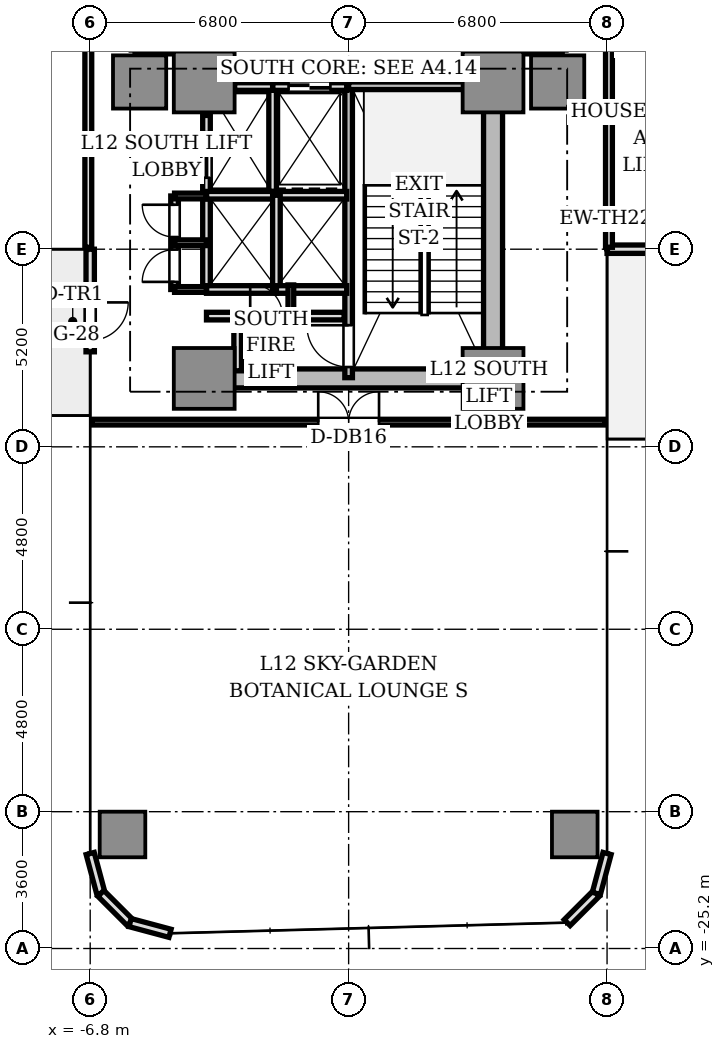
"""IFC4 building model, lengths in metres.
Left out: names, types, materials, properties, quantities, classifications, styles, units other than length and angle.
Written with IfcOpenShell. Run it as: python <this file> out.ifc"""

import sys

from ifc_helpers import new_model, si_unit, direction, frame, frame_2d, origin, origin_2d, place, context, subcontext, project, spatial, rectangle, extrude, source, transform, mapped, element, fill, save


model = new_model("IFC4")
c1 = context("Model", 3, precision=1e-05, world=origin(), true_north=direction((0.0, 1.0)))
c2 = subcontext(c1, "Body", "Model", "MODEL_VIEW")
j1 = project(units=[si_unit("LENGTHUNIT", "METRE"), si_unit("PLANEANGLEUNIT", "RADIAN")], contexts=[c1])
p1 = place(None, origin())
s1 = spatial("IfcSite", under=j1, at=p1, CompositionType="ELEMENT")
p2 = place(p1, origin())
s2 = spatial("IfcBuilding", under=s1, at=p2, CompositionType="ELEMENT")
p3 = place(p2, frame((0.0, 0.0, 46.55)))
s3 = spatial("IfcBuildingStorey", under=s2, at=p3, CompositionType="ELEMENT", Elevation=46.55)
p4 = place(p3, frame((-3.55, -10.2, 0.0), z_axis=(0.0, 0.0, 1.0), x_axis=(1.0, 0.0, 0.0)))
e1 = element("IfcWall", 1, at=p4, inside=s3, PredefinedType="SHEAR", context=c2, shape_type="SweptSolid", body=[
    extrude(rectangle(XDim=7.1, YDim=0.5, at=frame_2d((3.55, 0.0))), origin(), (0.0, 0.0, 1.0), 4.26),
])
p5 = place(p3, frame((3.8, -9.75, 0.0), z_axis=(0.0, 0.0, 1.0), x_axis=(0.0, 1.0, 0.0)))
e2 = element("IfcWall", 2, at=p5, inside=s3, PredefinedType="SHEAR", context=c2, shape_type="SweptSolid", body=[
    extrude(rectangle(XDim=6.9, YDim=0.5, at=frame_2d((3.45, 0.0))), origin(), (0.0, 0.0, 1.0), 4.26),
])
m1 = source(origin(), c2, "Body", "SweptSolid", [
    extrude(rectangle(XDim=1.6, YDim=1.6, at=origin_2d()), origin(), (0.0, 0.0, 1.0), 4.26),
])
for number, where, z_axis, x_axis in (
    (3, (-3.8, -2.4, 0.0), (0.0, 0.0, 1.0), (1.0, 0.0, 0.0)),
    (4, (3.8, -2.4, 0.0), (0.0, 0.0, 1.0), (1.0, 0.0, 0.0)),
    (5, (-3.8, -10.2, 0.0), (0.0, 0.0, 1.0), (1.0, 0.0, 0.0)),
    (6, (3.8, -10.2, 0.0), (0.0, 0.0, 1.0), (1.0, 0.0, 0.0)),
):
    element("IfcColumn", number, at=place(p3, frame(where, z_axis=z_axis, x_axis=x_axis)), inside=s3, PredefinedType="COLUMN", context=c2, shape_type="MappedRepresentation", body=[
        mapped(m1, transform((0.0, 0.0, 0.0), scale=1.0)),
    ])
m2 = source(origin(), c2, "Body", "SweptSolid", [
    extrude(rectangle(XDim=1.4, YDim=1.4, at=origin_2d()), origin(), (0.0, 0.0, 1.0), 4.26),
])
for number, where, z_axis, x_axis in (
    (7, (5.5, -2.4, 0.0), (0.0, 0.0, 1.0), (1.0, 0.0, 0.0)),
    (8, (-5.5, -2.4, 0.0), (0.0, 0.0, 1.0), (1.0, 0.0, 0.0)),
):
    element("IfcColumn", number, at=place(p3, frame(where, z_axis=z_axis, x_axis=x_axis)), inside=s3, PredefinedType="COLUMN", context=c2, shape_type="MappedRepresentation", body=[
        mapped(m2, transform((0.0, 0.0, 0.0), scale=1.0)),
    ])
m3 = source(origin(), c2, "Body", "SweptSolid", [
    extrude(rectangle(XDim=1.2, YDim=1.2, at=origin_2d()), origin(), (0.0, 0.0, 1.0), 4.26),
])
for number, where, z_axis, x_axis in (
    (9, (-5.95, -22.2, 0.0), (0.0, 0.0, 1.0), (1.0, 0.0, 0.0)),
    (10, (5.95, -22.2, 0.0), (0.0, 0.0, 1.0), (1.0, 0.0, 0.0)),
):
    element("IfcColumn", number, at=place(p3, frame(where, z_axis=z_axis, x_axis=x_axis)), inside=s3, PredefinedType="COLUMN", context=c2, shape_type="MappedRepresentation", body=[
        mapped(m3, transform((0.0, 0.0, 0.0), scale=1.0)),
    ])
p6 = place(p3, frame((6.8, -6.8, 0.0), z_axis=(0.0, 0.0, 1.0), x_axis=(1.0, 0.0, 0.0)))
e11 = element("IfcWall", 11, at=p6, inside=s3, PredefinedType="STANDARD", context=c2, shape_type="SweptSolid", body=[
    extrude(rectangle(XDim=2.7, YDim=0.22, at=frame_2d((1.35, 0.0))), origin(), (0.0, 0.0, 1.0), 4.26),
])
p7 = place(p6, frame((1.4, 0.0, 0.0)))
e12 = element("IfcOpeningElement", 12, at=p7, cuts=e11, PredefinedType="OPENING", context=c2, shape_type="SweptSolid", body=[
    extrude(rectangle(XDim=1.0, YDim=2.2, at=frame_2d((0.5, 1.1))), frame((0.0, 0.12, 0.0), z_axis=(0.0, -1.0, 0.0), x_axis=(1.0, 0.0, 0.0)), (0.0, 0.0, 1.0), 0.24),
])
p8 = place(p3, frame((-6.8, -6.8, 0.0), z_axis=(0.0, 0.0, 1.0), x_axis=(0.0, -1.0, 0.0)))
e13 = element("IfcWall", 13, at=p8, inside=s3, PredefinedType="STANDARD", context=c2, shape_type="SweptSolid", body=[
    extrude(rectangle(XDim=2.7, YDim=0.22, at=frame_2d((1.35, 0.0))), origin(), (0.0, 0.0, 1.0), 4.26),
])
p9 = place(p8, frame((1.4, 0.0, 0.0)))
e14 = element("IfcOpeningElement", 14, at=p9, cuts=e13, PredefinedType="OPENING", context=c2, shape_type="SweptSolid", body=[
    extrude(rectangle(XDim=1.0, YDim=2.2, at=frame_2d((0.5, 1.1))), frame((0.0, 0.12, 0.0), z_axis=(0.0, -1.0, 0.0), x_axis=(1.0, 0.0, 0.0)), (0.0, 0.0, 1.0), 0.24),
])
for number, where, z_axis, x_axis in (
    (15, (-6.8, -22.7, 0.0), (0.0, 0.0, 1.0), (0.259, -0.966, 0.0)),
    (16, (-6.519, -23.75, 0.0), (0.0, 0.0, 1.0), (0.707, -0.707, 0.0)),
    (17, (-5.75, -24.519, 0.0), (0.0, 0.0, 1.0), (0.966, -0.259, 0.0)),
    (18, (5.75, -24.519, 0.0), (0.0, 0.0, 1.0), (0.707, 0.707, 0.0)),
    (19, (6.519, -23.75, 0.0), (0.0, 0.0, 1.0), (0.259, 0.966, 0.0)),
):
    element("IfcWall", number, at=place(p3, frame(where, z_axis=z_axis, x_axis=x_axis)), inside=s3, PredefinedType="STANDARD", context=c2, shape_type="SweptSolid", body=[
        extrude(rectangle(XDim=1.087, YDim=0.22, at=frame_2d((0.543, 0.0))), origin(), (0.0, 0.0, 1.0), 4.26),
    ])
p10 = place(p3, frame((0.0, -10.18, 0.0), z_axis=(0.0, 0.0, 1.0), x_axis=(0.0, 1.0, 0.0)))
e20 = element("IfcWall", 20, at=p10, inside=s3, PredefinedType="SOLIDWALL", context=c2, shape_type="SweptSolid", body=[
    extrude(rectangle(XDim=7.68, YDim=0.2, at=frame_2d((3.84, 0.0))), origin(), (0.0, 0.0, 1.0), 4.26),
])
p11 = place(p10, frame((0.28, 0.0, 0.0)))
e21 = element("IfcOpeningElement", 21, at=p11, cuts=e20, PredefinedType="OPENING", context=c2, shape_type="SweptSolid", body=[
    extrude(rectangle(XDim=1.1, YDim=2.15, at=frame_2d((0.55, 1.075))), frame((0.0, 0.11, 0.0), z_axis=(0.0, -1.0, 0.0), x_axis=(1.0, 0.0, 0.0)), (0.0, 0.0, 1.0), 0.22),
])
p12 = place(p3, frame((0.0, -2.5, 0.0), z_axis=(0.0, 0.0, 1.0), x_axis=(1.0, 0.0, 0.0)))
e22 = element("IfcWall", 22, at=p12, inside=s3, PredefinedType="SOLIDWALL", context=c2, shape_type="SweptSolid", body=[
    extrude(rectangle(XDim=3.72, YDim=0.2, at=frame_2d((1.86, 0.0))), origin(), (0.0, 0.0, 1.0), 4.26),
])
p13 = place(p3, frame((-2.0, -5.28, 0.0), z_axis=(0.0, 0.0, 1.0), x_axis=(0.0, 1.0, 0.0)))
e23 = element("IfcWall", 23, at=p13, inside=s3, PredefinedType="SOLIDWALL", context=c2, shape_type="SweptSolid", body=[
    extrude(rectangle(XDim=2.78, YDim=0.2, at=frame_2d((1.39, 0.0))), origin(), (0.0, 0.0, 1.0), 3.81),
])
p14 = place(p3, frame((-2.0, -2.52, 0.0), z_axis=(0.0, 0.0, 1.0), x_axis=(1.0, 0.0, 0.0)))
e24 = element("IfcWall", 24, at=p14, inside=s3, PredefinedType="SOLIDWALL", context=c2, shape_type="SweptSolid", body=[
    extrude(rectangle(XDim=1.95, YDim=0.2, at=frame_2d((0.975, 0.0))), origin(), (0.0, 0.0, 1.0), 3.81),
])
p15 = place(p14, frame((0.42, 0.0, 0.0)))
e25 = element("IfcOpeningElement", 25, at=p15, cuts=e24, PredefinedType="OPENING", context=c2, shape_type="SweptSolid", body=[
    extrude(rectangle(XDim=1.1, YDim=2.2, at=frame_2d((0.55, 1.1))), frame((0.0, 0.11, 0.0), z_axis=(0.0, -1.0, 0.0), x_axis=(1.0, 0.0, 0.0)), (0.0, 0.0, 1.0), 0.22),
])
p16 = place(p3, frame((-3.0, -2.52, 0.0), z_axis=(0.0, 0.0, 1.0), x_axis=(1.0, 0.0, 0.0)))
e26 = element("IfcWall", 26, at=p16, inside=s3, PredefinedType="SOLIDWALL", context=c2, shape_type="SweptSolid", body=[
    extrude(rectangle(XDim=1.0, YDim=0.2, at=frame_2d((0.5, 0.0))), origin(), (0.0, 0.0, 1.0), 3.81),
])
p17 = place(p3, frame((-3.74, -5.36, 0.0), z_axis=(0.0, 0.0, 1.0), x_axis=(0.0, 1.0, 0.0)))
e27 = element("IfcWall", 27, at=p17, inside=s3, PredefinedType="SOLIDWALL", context=c2, shape_type="SweptSolid", body=[
    extrude(rectangle(XDim=2.08, YDim=0.2, at=frame_2d((1.04, 0.0))), origin(), (0.0, 0.0, 1.0), 3.81),
])
p18 = place(p17, frame((0.44, 0.0, 0.0)))
e28 = element("IfcOpeningElement", 28, at=p18, cuts=e27, PredefinedType="OPENING", context=c2, shape_type="SweptSolid", body=[
    extrude(rectangle(XDim=1.2, YDim=2.2, at=frame_2d((0.6, 1.1))), frame((0.0, 0.11, 0.0), z_axis=(0.0, -1.0, 0.0), x_axis=(1.0, 0.0, 0.0)), (0.0, 0.0, 1.0), 0.22),
])
p19 = place(p3, frame((-3.74, -7.86, 0.0), z_axis=(0.0, 0.0, 1.0), x_axis=(0.0, 1.0, 0.0)))
e29 = element("IfcWall", 29, at=p19, inside=s3, PredefinedType="SOLIDWALL", context=c2, shape_type="SweptSolid", body=[
    extrude(rectangle(XDim=2.48, YDim=0.2, at=frame_2d((1.24, 0.0))), origin(), (0.0, 0.0, 1.0), 3.81),
])
p20 = place(p3, frame((-3.74, -7.86, 0.0), z_axis=(0.0, 0.0, 1.0), x_axis=(1.0, 0.0, 0.0)))
e30 = element("IfcWall", 30, at=p20, inside=s3, PredefinedType="SOLIDWALL", context=c2, shape_type="SweptSolid", body=[
    extrude(rectangle(XDim=1.84, YDim=0.2, at=frame_2d((0.92, 0.0))), origin(), (0.0, 0.0, 1.0), 3.81),
])
p21 = place(p3, frame((-3.74, -5.38, 0.0), z_axis=(0.0, 0.0, 1.0), x_axis=(1.0, 0.0, 0.0)))
e31 = element("IfcWall", 31, at=p21, inside=s3, PredefinedType="SOLIDWALL", context=c2, shape_type="SweptSolid", body=[
    extrude(rectangle(XDim=3.69, YDim=0.2, at=frame_2d((1.845, 0.0))), origin(), (0.0, 0.0, 1.0), 3.81),
])
p22 = place(p3, frame((-1.9, -7.86, 0.0), z_axis=(0.0, 0.0, 1.0), x_axis=(0.0, 1.0, 0.0)))
e32 = element("IfcWall", 32, at=p22, inside=s3, PredefinedType="SOLIDWALL", context=c2, shape_type="SweptSolid", body=[
    extrude(rectangle(XDim=2.48, YDim=0.2, at=frame_2d((1.24, 0.0))), origin(), (0.0, 0.0, 1.0), 3.81),
])
p23 = place(p3, frame((-1.9, -7.86, 0.0), z_axis=(0.0, 0.0, 1.0), x_axis=(1.0, 0.0, 0.0)))
e33 = element("IfcWall", 33, at=p23, inside=s3, PredefinedType="SOLIDWALL", context=c2, shape_type="SweptSolid", body=[
    extrude(rectangle(XDim=1.85, YDim=0.2, at=frame_2d((0.925, 0.0))), origin(), (0.0, 0.0, 1.0), 3.81),
])
for number, where, z_axis, x_axis in (
    (34, (3.98, -1.56, 0.0), (0.0, 0.0, 1.0), (1.0, 0.0, 0.0)),
    (35, (-5.62, -1.56, 0.0), (0.0, 0.0, 1.0), (1.0, 0.0, 0.0)),
):
    element("IfcWall", number, at=place(p3, frame(where, z_axis=z_axis, x_axis=x_axis)), inside=s3, PredefinedType="SOLIDWALL", context=c2, shape_type="SweptSolid", body=[
        extrude(rectangle(XDim=1.64, YDim=0.2, at=frame_2d((0.82, 0.0))), origin(), (0.0, 0.0, 1.0), 3.81),
    ])
p24 = place(p3, frame((-3.74, -8.56, 0.0), z_axis=(0.0, 0.0, 1.0), x_axis=(1.0, 0.0, 0.0)))
e36 = element("IfcWall", 36, at=p24, inside=s3, PredefinedType="SOLIDWALL", context=c2, shape_type="SweptSolid", body=[
    extrude(rectangle(XDim=3.62, YDim=0.2, at=frame_2d((1.81, 0.0))), origin(), (0.0, 0.0, 1.0), 3.81),
])
p25 = place(p24, frame((1.15, 0.0, 0.0)))
e37 = element("IfcOpeningElement", 37, at=p25, cuts=e36, PredefinedType="OPENING", context=c2, shape_type="SweptSolid", body=[
    extrude(rectangle(XDim=0.85, YDim=2.1, at=frame_2d((0.425, 1.05))), frame((0.0, 0.11, 0.0), z_axis=(0.0, -1.0, 0.0), x_axis=(1.0, 0.0, 0.0)), (0.0, 0.0, 1.0), 0.22),
])
p26 = place(p3, frame((-2.92, -10.0, 0.0), z_axis=(0.0, 0.0, 1.0), x_axis=(0.0, 1.0, 0.0)))
e38 = element("IfcWall", 38, at=p26, inside=s3, PredefinedType="SOLIDWALL", context=c2, shape_type="SweptSolid", body=[
    extrude(rectangle(XDim=1.44, YDim=0.2, at=frame_2d((0.72, 0.0))), origin(), (0.0, 0.0, 1.0), 3.81),
])
p27 = place(p3, frame((-1.52, -8.56, 0.0), z_axis=(0.0, 0.0, 1.0), x_axis=(0.0, 1.0, 0.0)))
e39 = element("IfcWall", 39, at=p27, inside=s3, PredefinedType="PARTITIONING", context=c2, shape_type="SweptSolid", body=[
    extrude(rectangle(XDim=0.82, YDim=0.15, at=frame_2d((0.41, 0.0))), origin(), (0.0, 0.0, 1.0), 3.81),
])
p28 = place(p3, frame((-4.58, -7.86, 0.0), z_axis=(0.0, 0.0, 1.0), x_axis=(0.0, 1.0, 0.0)))
e40 = element("IfcWall", 40, at=p28, inside=s3, PredefinedType="SOLIDWALL", context=c2, shape_type="SweptSolid", body=[
    extrude(rectangle(XDim=2.46, YDim=0.2, at=frame_2d((1.23, 0.0))), origin(), (0.0, 0.0, 1.0), 3.81),
])
p29 = place(p28, frame((0.2, 0.0, 0.0)))
e41 = element("IfcOpeningElement", 41, at=p29, cuts=e40, PredefinedType="OPENING", context=c2, shape_type="SweptSolid", body=[
    extrude(rectangle(XDim=0.85, YDim=2.1, at=frame_2d((0.425, 1.05))), frame((0.0, 0.11, 0.0), z_axis=(0.0, -1.0, 0.0), x_axis=(1.0, 0.0, 0.0)), (0.0, 0.0, 1.0), 0.22),
])
p30 = place(p28, frame((1.38, 0.0, 0.0)))
e42 = element("IfcOpeningElement", 42, at=p30, cuts=e40, PredefinedType="OPENING", context=c2, shape_type="SweptSolid", body=[
    extrude(rectangle(XDim=0.85, YDim=2.1, at=frame_2d((0.425, 1.05))), frame((0.0, 0.11, 0.0), z_axis=(0.0, -1.0, 0.0), x_axis=(1.0, 0.0, 0.0)), (0.0, 0.0, 1.0), 0.22),
])
for number, where, z_axis, x_axis in (
    (43, (-4.58, -5.4, 0.0), (0.0, 0.0, 1.0), (1.0, 0.0, 0.0)),
    (44, (-4.58, -7.86, 0.0), (0.0, 0.0, 1.0), (1.0, 0.0, 0.0)),
    (45, (-4.58, -6.63, 0.0), (0.0, 0.0, 1.0), (1.0, 0.0, 0.0)),
):
    element("IfcWall", number, at=place(p3, frame(where, z_axis=z_axis, x_axis=x_axis)), inside=s3, PredefinedType="PARTITIONING", context=c2, shape_type="SweptSolid", body=[
        extrude(rectangle(XDim=0.84, YDim=0.15, at=frame_2d((0.42, 0.0))), origin(), (0.0, 0.0, 1.0), 3.81),
    ])
p31 = place(p3, frame((6.85, -6.75, 0.0), z_axis=(0.0, 0.0, 1.0), x_axis=(0.0, 1.0, 0.0)))
e46 = element("IfcWall", 46, at=p31, inside=s3, PredefinedType="PARTITIONING", context=c2, shape_type="SweptSolid", body=[
    extrude(rectangle(XDim=5.75, YDim=0.18, at=frame_2d((2.875, 0.0))), origin(), (0.0, 0.0, 1.0), 3.81),
])
p32 = place(p3, frame((-6.85, -0.95, 0.0), z_axis=(0.0, 0.0, 1.0), x_axis=(0.0, -1.0, 0.0)))
e47 = element("IfcWall", 47, at=p32, inside=s3, PredefinedType="PARTITIONING", context=c2, shape_type="SweptSolid", body=[
    extrude(rectangle(XDim=5.8, YDim=0.18, at=frame_2d((2.9, 0.0))), origin(), (0.0, 0.0, 1.0), 3.81),
])
p33 = place(p3, frame((-6.75, -11.35, 0.0), z_axis=(0.0, 0.0, 1.0), x_axis=(1.0, 0.0, 0.0)))
e48 = element("IfcWall", 48, at=p33, inside=s3, PredefinedType="PARTITIONING", context=c2, shape_type="SweptSolid", body=[
    extrude(rectangle(XDim=13.5, YDim=0.15, at=frame_2d((6.75, 0.0))), origin(), (0.0, 0.0, 1.0), 3.81),
])
p34 = place(p33, frame((5.95, 0.0, 0.0)))
e49 = element("IfcOpeningElement", 49, at=p34, cuts=e48, PredefinedType="OPENING", context=c2, shape_type="SweptSolid", body=[
    extrude(rectangle(XDim=1.6, YDim=2.25, at=frame_2d((0.8, 1.125))), frame((0.0, 0.085, 0.0), z_axis=(0.0, -1.0, 0.0), x_axis=(1.0, 0.0, 0.0)), (0.0, 0.0, 1.0), 0.17),
])
m4 = source(origin(), c2, "Body", "SweptSolid", [
    extrude(rectangle(XDim=1.0, YDim=0.05, at=origin_2d()), origin(), (0.0, 0.0, 1.0), 2.2),
])
p35 = place(p9, frame((0.5, 0.0, 0.0)))
e50 = element("IfcDoor", 50, at=p35, inside=s3, OperationType="SINGLE_SWING_LEFT", PredefinedType="DOOR", context=c2, shape_type="MappedRepresentation", body=[
    mapped(m4, transform((0.0, 0.0, 0.0), scale=1.0)),
])
fill(e14, e50)
m5 = source(origin(), c2, "Body", "SweptSolid", [
    extrude(rectangle(XDim=1.1, YDim=0.05, at=origin_2d()), origin(), (0.0, 0.0, 1.0), 2.2),
])
p36 = place(p15, frame((0.55, 0.0, 0.0)))
e51 = element("IfcDoor", 51, at=p36, inside=s3, OperationType="DOUBLE_DOOR_SLIDING", PredefinedType="DOOR", context=c2, shape_type="MappedRepresentation", body=[
    mapped(m5, transform((0.0, 0.0, 0.0), scale=1.0)),
])
fill(e25, e51)
m6 = source(origin(), c2, "Body", "SweptSolid", [
    extrude(rectangle(XDim=1.2, YDim=0.05, at=origin_2d()), origin(), (0.0, 0.0, 1.0), 2.2),
])
p37 = place(p18, frame((0.6, 0.0, 0.0)))
e52 = element("IfcDoor", 52, at=p37, inside=s3, OperationType="DOUBLE_DOOR_SLIDING", PredefinedType="DOOR", context=c2, shape_type="MappedRepresentation", body=[
    mapped(m6, transform((0.0, 0.0, 0.0), scale=1.0)),
])
fill(e28, e52)
m7 = source(origin(), c2, "Body", "SweptSolid", [
    extrude(rectangle(XDim=1.1, YDim=0.05, at=origin_2d()), origin(), (0.0, 0.0, 1.0), 2.15),
])
p38 = place(p11, frame((0.55, 0.0, 0.0)))
e53 = element("IfcDoor", 53, at=p38, inside=s3, OperationType="SINGLE_SWING_RIGHT", PredefinedType="DOOR", context=c2, shape_type="MappedRepresentation", body=[
    mapped(m7, transform((0.0, 0.0, 0.0), scale=1.0)),
])
fill(e21, e53)
m8 = source(origin(), c2, "Body", "SweptSolid", [
    extrude(rectangle(XDim=0.85, YDim=0.05, at=origin_2d()), origin(), (0.0, 0.0, 1.0), 2.1),
])
p39 = place(p25, frame((0.425, 0.0, 0.0)))
e54 = element("IfcDoor", 54, at=p39, inside=s3, OperationType="SINGLE_SWING_LEFT", PredefinedType="DOOR", context=c2, shape_type="MappedRepresentation", body=[
    mapped(m8, transform((0.0, 0.0, 0.0), scale=1.0)),
])
fill(e37, e54)
p40 = place(p29, frame((0.425, 0.0, 0.0)))
e55 = element("IfcDoor", 55, at=p40, inside=s3, OperationType="SINGLE_SWING_LEFT", PredefinedType="DOOR", context=c2, shape_type="MappedRepresentation", body=[
    mapped(m8, transform((0.0, 0.0, 0.0), scale=1.0)),
])
fill(e41, e55)
p41 = place(p30, frame((0.425, 0.0, 0.0)))
e56 = element("IfcDoor", 56, at=p41, inside=s3, OperationType="SINGLE_SWING_RIGHT", PredefinedType="DOOR", context=c2, shape_type="MappedRepresentation", body=[
    mapped(m8, transform((0.0, 0.0, 0.0), scale=1.0)),
])
fill(e42, e56)
m9 = source(origin(), c2, "Body", "SweptSolid", [
    extrude(rectangle(XDim=1.6, YDim=0.05, at=origin_2d()), origin(), (0.0, 0.0, 1.0), 2.25),
])
p42 = place(p34, frame((0.8, 0.0, 0.0)))
e57 = element("IfcDoor", 57, at=p42, inside=s3, OperationType="DOUBLE_DOOR_SINGLE_SWING", PredefinedType="DOOR", context=c2, shape_type="MappedRepresentation", body=[
    mapped(m9, transform((0.0, 0.0, 0.0), scale=1.0)),
])
fill(e49, e57)
save(model, sys.argv[1])
